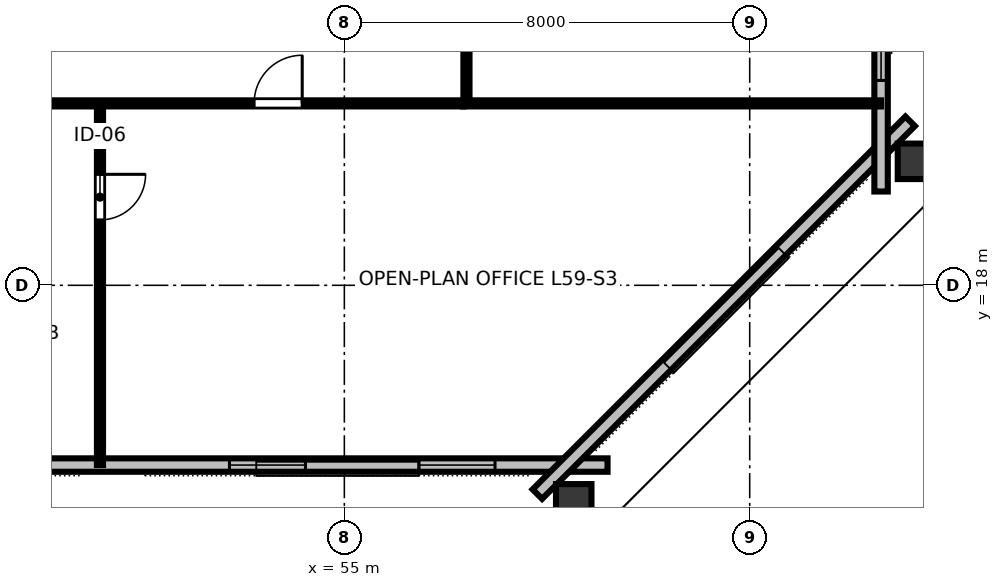
"""IFC4 building model, lengths in metres.
Left out: names, types, materials, properties, quantities, classifications, styles, units other than length and angle.
Written with IfcOpenShell. Run it as: python <this file> out.ifc"""

import sys

from ifc_helpers import new_model, si_unit, direction, frame, frame_2d, origin, origin_2d, place, context, subcontext, project, spatial, rectangle, hollow_rectangle, extrude, element, fill, save


model = new_model("IFC4")
c1 = context("Model", 3, precision=1e-05, world=origin(), true_north=direction((0.0, 1.0)))
c2 = subcontext(c1, "Body", "Model", "MODEL_VIEW")
j1 = project(units=[si_unit("LENGTHUNIT", "METRE"), si_unit("PLANEANGLEUNIT", "RADIAN")], contexts=[c1])
p1 = place(None, origin())
s1 = spatial("IfcSite", under=j1, at=p1, CompositionType="ELEMENT")
p2 = place(p1, origin())
s2 = spatial("IfcBuilding", under=s1, at=p2, CompositionType="ELEMENT")
p3 = place(p2, frame((0.0, 0.0, 223.8)))
s3 = spatial("IfcBuildingStorey", under=s2, at=p3, CompositionType="ELEMENT", Elevation=223.8)
for number, where, z_axis, x_axis in (
    (1, (59.527, 13.652, 0.0), (0.0, 0.0, 1.0), (1.0, 0.0, 0.0)),
    (2, (66.347, 20.446, 0.0), (0.0, 0.0, 1.0), (0.0, 1.0, 0.0)),
):
    element("IfcColumn", number, at=place(p3, frame(where, z_axis=z_axis, x_axis=x_axis)), inside=s3, PredefinedType="COLUMN", context=c2, shape_type="SweptSolid", body=[
        extrude(hollow_rectangle(XDim=0.7, YDim=0.85, WallThickness=0.04, at=origin_2d()), origin(), (0.0, 0.0, 1.0), 3.373),
    ])
p4 = place(p3, frame((31.805, 14.453, 0.0), z_axis=(0.0, 0.0, 1.0), x_axis=(1.0, 0.0, 0.0)))
e3 = element("IfcWall", 3, at=p4, inside=s3, PredefinedType="STANDARD", context=c2, shape_type="SweptSolid", body=[
    extrude(rectangle(XDim=28.389, YDim=0.265, at=frame_2d((14.195, 0.0))), origin(), (0.0, 0.0, 1.0), 3.375),
])
p5 = place(p4, frame((2.221, 0.0, 0.85)))
e4 = element("IfcOpeningElement", 4, at=p5, cuts=e3, PredefinedType="OPENING", context=c2, shape_type="SweptSolid", body=[
    extrude(rectangle(XDim=1.5, YDim=1.85, at=frame_2d((0.75, 0.925))), frame((0.0, 0.142, 0.0), z_axis=(0.0, -1.0, 0.0), x_axis=(1.0, 0.0, 0.0)), (0.0, 0.0, 1.0), 0.285),
])
p6 = place(p4, frame((5.962, 0.0, 0.85)))
e5 = element("IfcOpeningElement", 5, at=p6, cuts=e3, PredefinedType="OPENING", context=c2, shape_type="SweptSolid", body=[
    extrude(rectangle(XDim=1.5, YDim=1.85, at=frame_2d((0.75, 0.925))), frame((0.0, 0.142, 0.0), z_axis=(0.0, -1.0, 0.0), x_axis=(1.0, 0.0, 0.0)), (0.0, 0.0, 1.0), 0.285),
])
p7 = place(p4, frame((9.703, 0.0, 0.85)))
e6 = element("IfcOpeningElement", 6, at=p7, cuts=e3, PredefinedType="OPENING", context=c2, shape_type="SweptSolid", body=[
    extrude(rectangle(XDim=1.5, YDim=1.85, at=frame_2d((0.75, 0.925))), frame((0.0, 0.142, 0.0), z_axis=(0.0, -1.0, 0.0), x_axis=(1.0, 0.0, 0.0)), (0.0, 0.0, 1.0), 0.285),
])
p8 = place(p4, frame((20.927, 0.0, 0.85)))
e7 = element("IfcOpeningElement", 7, at=p8, cuts=e3, PredefinedType="OPENING", context=c2, shape_type="SweptSolid", body=[
    extrude(rectangle(XDim=1.5, YDim=1.85, at=frame_2d((0.75, 0.925))), frame((0.0, 0.142, 0.0), z_axis=(0.0, -1.0, 0.0), x_axis=(1.0, 0.0, 0.0)), (0.0, 0.0, 1.0), 0.285),
])
p9 = place(p4, frame((24.668, 0.0, 0.85)))
e8 = element("IfcOpeningElement", 8, at=p9, cuts=e3, PredefinedType="OPENING", context=c2, shape_type="SweptSolid", body=[
    extrude(rectangle(XDim=1.5, YDim=1.85, at=frame_2d((0.75, 0.925))), frame((0.0, 0.142, 0.0), z_axis=(0.0, -1.0, 0.0), x_axis=(1.0, 0.0, 0.0)), (0.0, 0.0, 1.0), 0.285),
])
p10 = place(p3, frame((58.809, 13.879, 0.0), z_axis=(0.0, 0.0, 1.0), x_axis=(0.707106781187, 0.707106781187, 0.0)))
e9 = element("IfcWall", 9, at=p10, inside=s3, PredefinedType="STANDARD", context=c2, shape_type="SweptSolid", body=[
    extrude(rectangle(XDim=10.405, YDim=0.265, at=frame_2d((5.203, 0.0))), origin(), (0.0, 0.0, 1.0), 3.375),
])
p11 = place(p3, frame((65.593, 19.851, 0.0), z_axis=(0.0, 0.0, 1.0), x_axis=(0.0, 1.0, 0.0)))
e10 = element("IfcWall", 10, at=p11, inside=s3, PredefinedType="STANDARD", context=c2, shape_type="SweptSolid", body=[
    extrude(rectangle(XDim=24.298, YDim=0.265, at=frame_2d((12.149, 0.0))), origin(), (0.0, 0.0, 1.0), 3.375),
])
p12 = place(p11, frame((13.499, 0.0, 0.0)))
e11 = element("IfcOpeningElement", 11, at=p12, cuts=e10, PredefinedType="OPENING", context=c2, shape_type="SweptSolid", body=[
    extrude(rectangle(XDim=1.4, YDim=2.15, at=frame_2d((0.7, 1.075))), frame((0.0, 0.142, 0.0), z_axis=(0.0, -1.0, 0.0), x_axis=(1.0, 0.0, 0.0)), (0.0, 0.0, 1.0), 0.285),
])
p13 = place(p11, frame((2.191, 0.0, 0.85)))
e12 = element("IfcOpeningElement", 12, at=p13, cuts=e10, PredefinedType="OPENING", context=c2, shape_type="SweptSolid", body=[
    extrude(rectangle(XDim=1.5, YDim=1.85, at=frame_2d((0.75, 0.925))), frame((0.0, 0.142, 0.0), z_axis=(0.0, -1.0, 0.0), x_axis=(1.0, 0.0, 0.0)), (0.0, 0.0, 1.0), 0.285),
])
p14 = place(p11, frame((5.875, 0.0, 0.85)))
e13 = element("IfcOpeningElement", 13, at=p14, cuts=e10, PredefinedType="OPENING", context=c2, shape_type="SweptSolid", body=[
    extrude(rectangle(XDim=1.5, YDim=1.85, at=frame_2d((0.75, 0.925))), frame((0.0, 0.142, 0.0), z_axis=(0.0, -1.0, 0.0), x_axis=(1.0, 0.0, 0.0)), (0.0, 0.0, 1.0), 0.285),
])
p15 = place(p11, frame((9.558, 0.0, 0.85)))
e14 = element("IfcOpeningElement", 14, at=p15, cuts=e10, PredefinedType="OPENING", context=c2, shape_type="SweptSolid", body=[
    extrude(rectangle(XDim=1.5, YDim=1.85, at=frame_2d((0.75, 0.925))), frame((0.0, 0.142, 0.0), z_axis=(0.0, -1.0, 0.0), x_axis=(1.0, 0.0, 0.0)), (0.0, 0.0, 1.0), 0.285),
])
p16 = place(p11, frame((16.924, 0.0, 0.85)))
e15 = element("IfcOpeningElement", 15, at=p16, cuts=e10, PredefinedType="OPENING", context=c2, shape_type="SweptSolid", body=[
    extrude(rectangle(XDim=1.5, YDim=1.85, at=frame_2d((0.75, 0.925))), frame((0.0, 0.142, 0.0), z_axis=(0.0, -1.0, 0.0), x_axis=(1.0, 0.0, 0.0)), (0.0, 0.0, 1.0), 0.285),
])
p17 = place(p11, frame((20.607, 0.0, 0.85)))
e16 = element("IfcOpeningElement", 16, at=p17, cuts=e10, PredefinedType="OPENING", context=c2, shape_type="SweptSolid", body=[
    extrude(rectangle(XDim=1.5, YDim=1.85, at=frame_2d((0.75, 0.925))), frame((0.0, 0.142, 0.0), z_axis=(0.0, -1.0, 0.0), x_axis=(1.0, 0.0, 0.0)), (0.0, 0.0, 1.0), 0.285),
])
p18 = place(p3, frame((50.177, 21.59, 0.0), z_axis=(0.0, 0.0, 1.0), x_axis=(0.0, -1.0, 0.0)))
e17 = element("IfcWall", 17, at=p18, inside=s3, PredefinedType="PARTITIONING", context=c2, shape_type="SweptSolid", body=[
    extrude(rectangle(XDim=7.137, YDim=0.12, at=frame_2d((3.569, 0.0))), origin(), (0.0, 0.0, 1.0), 2.655),
])
p19 = place(p18, frame((1.4, 0.0, 0.0)))
e18 = element("IfcOpeningElement", 18, at=p19, cuts=e17, PredefinedType="OPENING", context=c2, shape_type="SweptSolid", body=[
    extrude(rectangle(XDim=0.9, YDim=2.15, at=frame_2d((0.45, 1.075))), frame((0.0, 0.07, 0.0), z_axis=(0.0, -1.0, 0.0), x_axis=(1.0, 0.0, 0.0)), (0.0, 0.0, 1.0), 0.14),
])
p20 = place(p3, frame((47.02, 21.59, 0.0), z_axis=(0.0, 0.0, 1.0), x_axis=(1.0, 0.0, 0.0)))
e19 = element("IfcWall", 19, at=p20, inside=s3, PredefinedType="PARTITIONING", context=c2, shape_type="SweptSolid", body=[
    extrude(rectangle(XDim=10.33, YDim=0.12, at=frame_2d((5.165, 0.0))), origin(), (0.0, 0.0, 1.0), 2.655),
])
p21 = place(p20, frame((1.104, 0.0, 0.0)))
e20 = element("IfcOpeningElement", 20, at=p21, cuts=e19, PredefinedType="OPENING", context=c2, shape_type="SweptSolid", body=[
    extrude(rectangle(XDim=0.95, YDim=2.15, at=frame_2d((0.475, 1.075))), frame((0.0, 0.07, 0.0), z_axis=(0.0, -1.0, 0.0), x_axis=(1.0, 0.0, 0.0)), (0.0, 0.0, 1.0), 0.14),
])
p22 = place(p20, frame((6.199, 0.0, 0.0)))
e21 = element("IfcOpeningElement", 21, at=p22, cuts=e19, PredefinedType="OPENING", context=c2, shape_type="SweptSolid", body=[
    extrude(rectangle(XDim=0.95, YDim=2.15, at=frame_2d((0.475, 1.075))), frame((0.0, 0.07, 0.0), z_axis=(0.0, -1.0, 0.0), x_axis=(1.0, 0.0, 0.0)), (0.0, 0.0, 1.0), 0.14),
])
p23 = place(p3, frame((57.41, 21.65, 0.0), z_axis=(0.0, 0.0, 1.0), x_axis=(0.0, 1.0, 0.0)))
e22 = element("IfcWall", 22, at=p23, inside=s3, PredefinedType="PARTITIONING", context=c2, shape_type="SweptSolid", body=[
    extrude(rectangle(XDim=20.7, YDim=0.12, at=frame_2d((10.35, 0.0))), origin(), (0.0, 0.0, 1.0), 2.655),
])
p24 = place(p23, frame((9.875, 0.0, 0.0)))
e23 = element("IfcOpeningElement", 23, at=p24, cuts=e22, PredefinedType="OPENING", context=c2, shape_type="SweptSolid", body=[
    extrude(rectangle(XDim=0.95, YDim=2.15, at=frame_2d((0.475, 1.075))), frame((0.0, 0.07, 0.0), z_axis=(0.0, -1.0, 0.0), x_axis=(1.0, 0.0, 0.0)), (0.0, 0.0, 1.0), 0.14),
])
p25 = place(p3, frame((57.35, 21.59, 0.0), z_axis=(0.0, 0.0, 1.0), x_axis=(1.0, 0.0, 0.0)))
e24 = element("IfcWall", 24, at=p25, inside=s3, PredefinedType="PARTITIONING", context=c2, shape_type="SweptSolid", body=[
    extrude(rectangle(XDim=8.243, YDim=0.12, at=frame_2d((4.121, 0.0))), origin(), (0.0, 0.0, 1.0), 2.655),
])
p26 = place(p8, origin())
e25 = element("IfcWindow", 25, at=p26, inside=s3, PartitioningType="SINGLE_PANEL", PredefinedType="WINDOW", context=c2, shape_type="SweptSolid", body=[
    extrude(rectangle(XDim=1.5, YDim=1.85, at=frame_2d((0.75, 0.925))), frame((0.0, 0.03, 0.0), z_axis=(0.0, -1.0, 0.0), x_axis=(1.0, 0.0, 0.0)), (0.0, 0.0, 1.0), 0.06),
])
fill(e7, e25)
p27 = place(p9, origin())
e26 = element("IfcWindow", 26, at=p27, inside=s3, PartitioningType="SINGLE_PANEL", PredefinedType="WINDOW", context=c2, shape_type="SweptSolid", body=[
    extrude(rectangle(XDim=1.5, YDim=1.85, at=frame_2d((0.75, 0.925))), frame((0.0, 0.03, 0.0), z_axis=(0.0, -1.0, 0.0), x_axis=(1.0, 0.0, 0.0)), (0.0, 0.0, 1.0), 0.06),
])
fill(e8, e26)
p28 = place(p13, origin())
e27 = element("IfcWindow", 27, at=p28, inside=s3, PartitioningType="SINGLE_PANEL", PredefinedType="WINDOW", context=c2, shape_type="SweptSolid", body=[
    extrude(rectangle(XDim=1.5, YDim=1.85, at=frame_2d((0.75, 0.925))), frame((0.0, 0.03, 0.0), z_axis=(0.0, -1.0, 0.0), x_axis=(1.0, 0.0, 0.0)), (0.0, 0.0, 1.0), 0.06),
])
fill(e12, e27)
p29 = place(p19, origin())
e28 = element("IfcDoor", 28, at=p29, inside=s3, OperationType="SINGLE_SWING_LEFT", PredefinedType="DOOR", context=c2, shape_type="SweptSolid", body=[
    extrude(rectangle(XDim=0.9, YDim=2.15, at=frame_2d((0.45, 1.075))), frame((0.0, 0.025, 0.0), z_axis=(0.0, -1.0, 0.0), x_axis=(1.0, 0.0, 0.0)), (0.0, 0.0, 1.0), 0.05),
])
fill(e18, e28)
p30 = place(p22, origin())
e29 = element("IfcDoor", 29, at=p30, inside=s3, OperationType="SINGLE_SWING_RIGHT", PredefinedType="DOOR", context=c2, shape_type="SweptSolid", body=[
    extrude(rectangle(XDim=0.95, YDim=2.15, at=frame_2d((0.475, 1.075))), frame((0.0, 0.025, 0.0), z_axis=(0.0, -1.0, 0.0), x_axis=(1.0, 0.0, 0.0)), (0.0, 0.0, 1.0), 0.05),
])
fill(e21, e29)
save(model, sys.argv[1])
